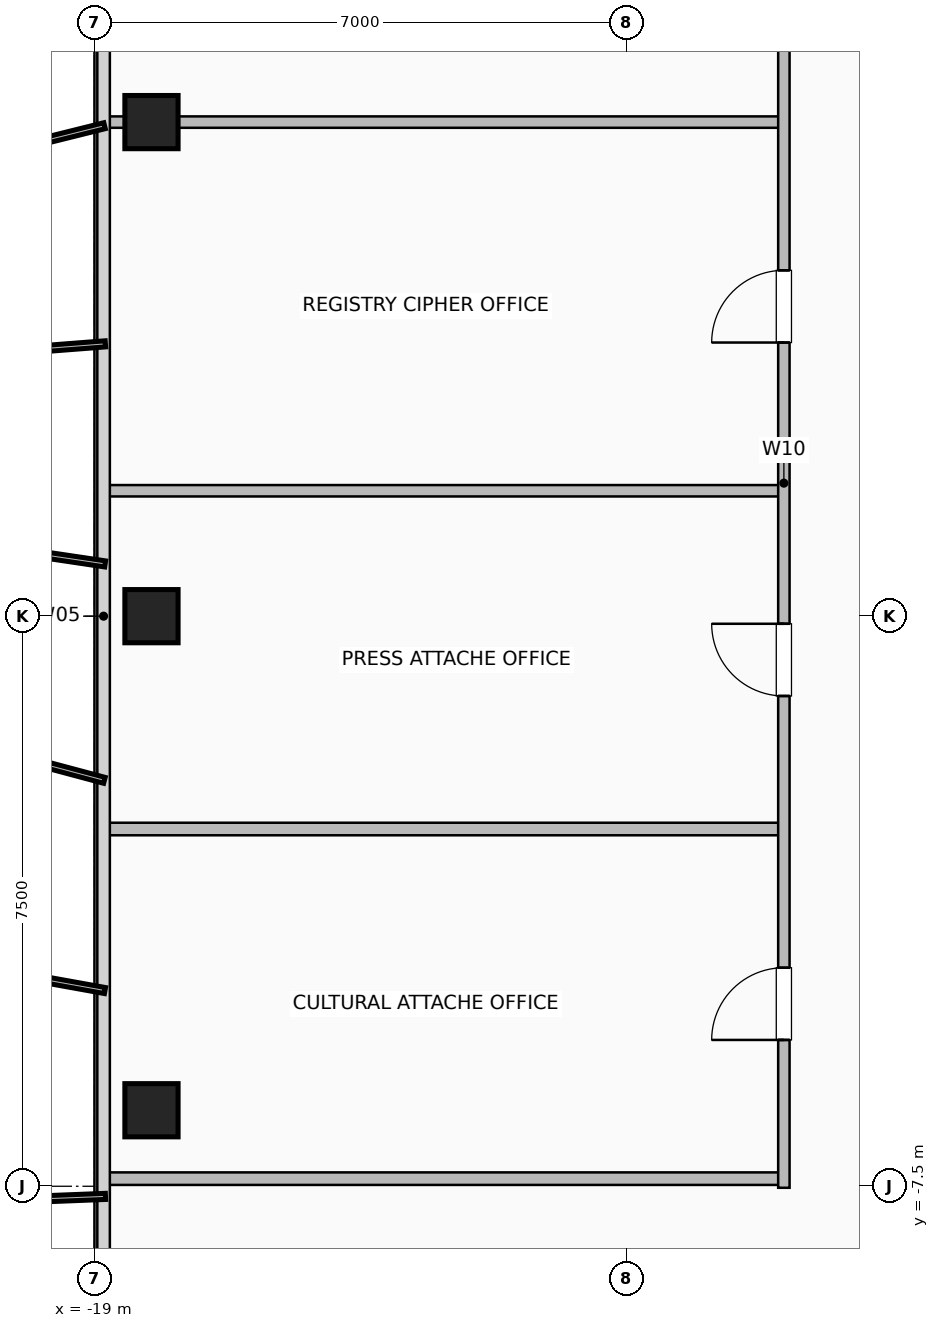
"""IFC4 building model, lengths in metres.
Left out: names, types, materials, properties, quantities, classifications, styles, units other than length and angle.
Written with IfcOpenShell. Run it as: python <this file> out.ifc"""

import sys

from ifc_helpers import new_model, si_unit, direction, frame, frame_2d, origin, origin_2d, place, context, subcontext, project, spatial, rectangle, hollow_rectangle, extrude, element, fill, save


model = new_model("IFC4")
c1 = context("Model", 3, precision=1e-05, world=origin(), true_north=direction((0.0, 1.0)))
c2 = subcontext(c1, "Body", "Model", "MODEL_VIEW")
j1 = project(units=[si_unit("LENGTHUNIT", "METRE"), si_unit("PLANEANGLEUNIT", "RADIAN")], contexts=[c1])
p1 = place(None, origin())
s1 = spatial("IfcSite", under=j1, at=p1, CompositionType="ELEMENT")
p2 = place(p1, origin())
s2 = spatial("IfcBuilding", under=s1, at=p2, CompositionType="ELEMENT")
p3 = place(p2, frame((0.0, 0.0, 239.6)))
s3 = spatial("IfcBuildingStorey", under=s2, at=p3, CompositionType="ELEMENT", Elevation=239.6)
for number, where, z_axis, x_axis in (
    (1, (-18.25, -6.5, 0.0), (0.0, 0.0, 1.0), (1.0, 0.0, 0.0)),
    (2, (-18.25, 0.0, 0.0), (0.0, 0.0, 1.0), (1.0, 0.0, 0.0)),
    (3, (-18.25, 6.5, 0.0), (0.0, 0.0, 1.0), (1.0, 0.0, 0.0)),
):
    element("IfcColumn", number, at=place(p3, frame(where, z_axis=z_axis, x_axis=x_axis)), inside=s3, PredefinedType="COLUMN", context=c2, shape_type="SweptSolid", body=[
        extrude(hollow_rectangle(XDim=0.7, YDim=0.7, WallThickness=0.035, at=origin_2d()), origin(), (0.0, 0.0, 1.0), 3.6),
    ])
for number, where, z_axis, x_axis in (
    (4, (-18.82, -7.4, 0.0), (0.0, 0.0, 1.0), (1.0, 0.0, 0.0)),
    (5, (-18.82, -2.8, 0.0), (0.0, 0.0, 1.0), (1.0, 0.0, 0.0)),
):
    element("IfcWall", number, at=place(p3, frame(where, z_axis=z_axis, x_axis=x_axis)), inside=s3, PredefinedType="PLUMBINGWALL", context=c2, shape_type="SweptSolid", body=[
        extrude(rectangle(XDim=8.89, YDim=0.165, at=frame_2d((4.445, 0.0))), origin(), (0.0, 0.0, 1.0), 3.36),
    ])
for number, where, z_axis, x_axis in (
    (6, (-18.82, 1.65, 0.0), (0.0, 0.0, 1.0), (1.0, 0.0, 0.0)),
    (7, (-18.82, 6.5, 0.0), (0.0, 0.0, 1.0), (1.0, 0.0, 0.0)),
):
    element("IfcWall", number, at=place(p3, frame(where, z_axis=z_axis, x_axis=x_axis)), inside=s3, PredefinedType="PARTITIONING", context=c2, shape_type="SweptSolid", body=[
        extrude(rectangle(XDim=8.89, YDim=0.15, at=frame_2d((4.445, 0.0))), origin(), (0.0, 0.0, 1.0), 3.36),
    ])
p4 = place(p3, frame((-9.93, -7.52, 0.0), z_axis=(0.0, 0.0, 1.0), x_axis=(0.0, 1.0, 0.0)))
e8 = element("IfcWall", 8, at=p4, inside=s3, PredefinedType="PARTITIONING", context=c2, shape_type="SweptSolid", body=[
    extrude(rectangle(XDim=20.09, YDim=0.15, at=frame_2d((10.045, 0.0))), origin(), (0.0, 0.0, 1.0), 3.36),
])
p5 = place(p4, frame((1.945, 0.0, 0.0)))
e9 = element("IfcOpeningElement", 9, at=p5, cuts=e8, PredefinedType="OPENING", context=c2, shape_type="SweptSolid", body=[
    extrude(rectangle(XDim=0.95, YDim=2.06, at=frame_2d((0.475, 1.03))), frame((0.0, 0.085, 0.0), z_axis=(0.0, -1.0, 0.0), x_axis=(1.0, 0.0, 0.0)), (0.0, 0.0, 1.0), 0.17),
])
p6 = place(p4, frame((6.47, 0.0, 0.0)))
e10 = element("IfcOpeningElement", 10, at=p6, cuts=e8, PredefinedType="OPENING", context=c2, shape_type="SweptSolid", body=[
    extrude(rectangle(XDim=0.95, YDim=2.06, at=frame_2d((0.475, 1.03))), frame((0.0, 0.085, 0.0), z_axis=(0.0, -1.0, 0.0), x_axis=(1.0, 0.0, 0.0)), (0.0, 0.0, 1.0), 0.17),
])
p7 = place(p4, frame((11.12, 0.0, 0.0)))
e11 = element("IfcOpeningElement", 11, at=p7, cuts=e8, PredefinedType="OPENING", context=c2, shape_type="SweptSolid", body=[
    extrude(rectangle(XDim=0.95, YDim=2.06, at=frame_2d((0.475, 1.03))), frame((0.0, 0.085, 0.0), z_axis=(0.0, -1.0, 0.0), x_axis=(1.0, 0.0, 0.0)), (0.0, 0.0, 1.0), 0.17),
])
p8 = place(p4, frame((15.035, 0.0, 0.0)))
e12 = element("IfcOpeningElement", 12, at=p8, cuts=e8, PredefinedType="OPENING", context=c2, shape_type="SweptSolid", body=[
    extrude(rectangle(XDim=0.85, YDim=2.05, at=frame_2d((0.425, 1.025))), frame((0.0, 0.085, 0.0), z_axis=(0.0, -1.0, 0.0), x_axis=(1.0, 0.0, 0.0)), (0.0, 0.0, 1.0), 0.17),
])
p9 = place(p4, frame((17.96, 0.0, 0.0)))
e13 = element("IfcOpeningElement", 13, at=p9, cuts=e8, PredefinedType="OPENING", context=c2, shape_type="SweptSolid", body=[
    extrude(rectangle(XDim=0.95, YDim=2.06, at=frame_2d((0.475, 1.03))), frame((0.0, 0.085, 0.0), z_axis=(0.0, -1.0, 0.0), x_axis=(1.0, 0.0, 0.0)), (0.0, 0.0, 1.0), 0.17),
])
p10 = place(p5, origin())
e14 = element("IfcDoor", 14, at=p10, inside=s3, OperationType="SINGLE_SWING_LEFT", PredefinedType="DOOR", context=c2, shape_type="SweptSolid", body=[
    extrude(rectangle(XDim=0.95, YDim=2.06, at=frame_2d((0.475, 1.03))), frame((0.0, 0.025, 0.0), z_axis=(0.0, -1.0, 0.0), x_axis=(1.0, 0.0, 0.0)), (0.0, 0.0, 1.0), 0.05),
])
fill(e9, e14)
p11 = place(p6, origin())
e15 = element("IfcDoor", 15, at=p11, inside=s3, OperationType="SINGLE_SWING_RIGHT", PredefinedType="DOOR", context=c2, shape_type="SweptSolid", body=[
    extrude(rectangle(XDim=0.95, YDim=2.06, at=frame_2d((0.475, 1.03))), frame((0.0, 0.025, 0.0), z_axis=(0.0, -1.0, 0.0), x_axis=(1.0, 0.0, 0.0)), (0.0, 0.0, 1.0), 0.05),
])
fill(e10, e15)
p12 = place(p7, origin())
e16 = element("IfcDoor", 16, at=p12, inside=s3, OperationType="SINGLE_SWING_LEFT", PredefinedType="DOOR", context=c2, shape_type="SweptSolid", body=[
    extrude(rectangle(XDim=0.95, YDim=2.06, at=frame_2d((0.475, 1.03))), frame((0.0, 0.025, 0.0), z_axis=(0.0, -1.0, 0.0), x_axis=(1.0, 0.0, 0.0)), (0.0, 0.0, 1.0), 0.05),
])
fill(e11, e16)
save(model, sys.argv[1])
